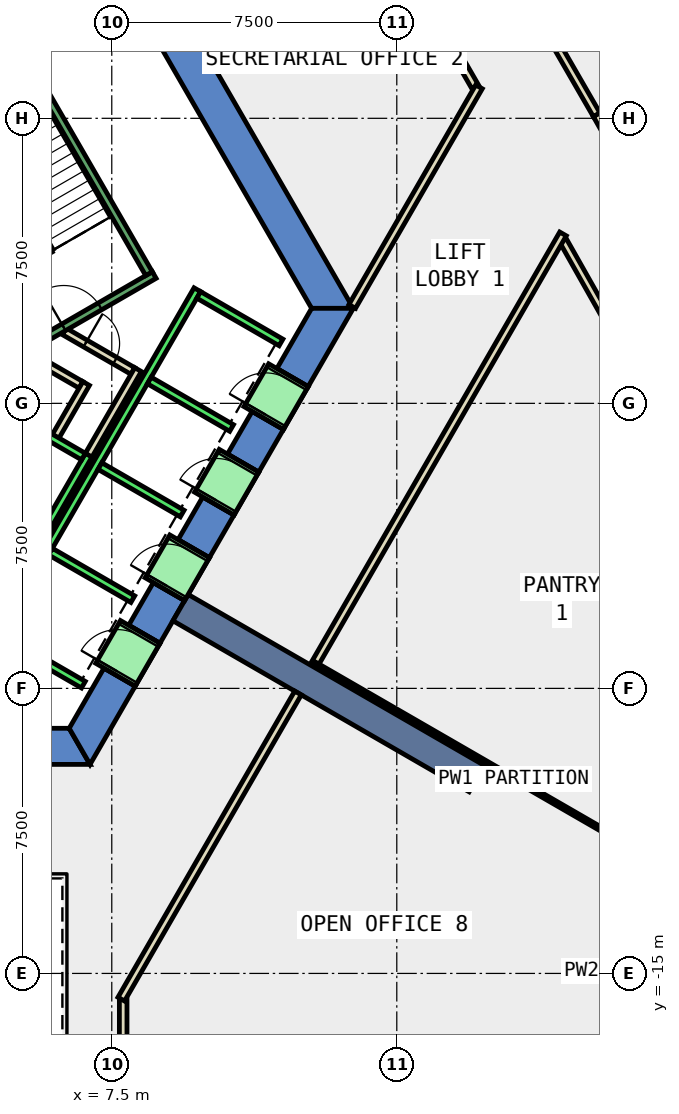
"""IFC4 building model, lengths in metres.
Left out: names, types, materials, properties, quantities, classifications, styles, units other than length and angle.
Written with IfcOpenShell. Run it as: python <this file> out.ifc"""

import sys

from ifc_helpers import new_model, si_unit, direction, frame, frame_2d, origin, place, context, subcontext, project, spatial, polyline, rectangle, outline, extrude, element, fill, save


model = new_model("IFC4")
c1 = context("Model", 3, precision=1e-05, world=origin(), true_north=direction((0.0, 1.0)))
c2 = subcontext(c1, "Body", "Model", "MODEL_VIEW")
j1 = project(units=[si_unit("LENGTHUNIT", "METRE"), si_unit("PLANEANGLEUNIT", "RADIAN")], contexts=[c1])
p1 = place(None, origin())
s1 = spatial("IfcSite", under=j1, at=p1, CompositionType="ELEMENT")
p2 = place(p1, origin())
s2 = spatial("IfcBuilding", under=s1, at=p2, CompositionType="ELEMENT")
p3 = place(p2, frame((0.0, 0.0, 72.8)))
s3 = spatial("IfcBuildingStorey", under=s2, at=p3, CompositionType="ELEMENT", Elevation=72.8)
p4 = place(p3, frame((0.0, 0.0, -0.4)))
e1 = element("IfcWall", 1, at=p4, inside=s3, PredefinedType="SHEAR", context=c2, shape_type="SweptSolid", body=[
    extrude(outline(polyline([(8.517, 11.748), (7.694, 11.273), (12.759, 2.5), (13.856, 2.5), (8.517, 11.748)])), origin(), (0.0, 0.0, 1.0), 4.2),
])
p5 = place(p3, frame((0.0, 0.0, -0.4)))
e2 = element("IfcWall", 2, at=p5, inside=s3, PredefinedType="SHEAR", context=c2, shape_type="SweptSolid", body=[
    extrude(outline(polyline([(5.75, -8.55), (5.75, -9.5), (6.928, -9.5), (6.38, -8.55), (5.75, -8.55)])), origin(), (0.0, 0.0, 1.0), 4.2),
])
p6 = place(p3, frame((0.0, 0.0, -0.4)))
e3 = element("IfcWall", 3, at=p6, inside=s3, PredefinedType="SHEAR", context=c2, shape_type="SweptSolid", body=[
    extrude(outline(polyline([(8.117, -7.44), (7.295, -6.965), (6.38, -8.55), (6.928, -9.5), (8.117, -7.44)])), origin(), (0.0, 0.0, 1.0), 4.2),
])
p7 = place(p3, frame((0.0, 0.0, -0.4)))
e4 = element("IfcWall", 4, at=p7, inside=s3, PredefinedType="SHEAR", context=c2, shape_type="SweptSolid", body=[
    extrude(outline(polyline([(9.417, -5.189), (8.594, -4.714), (7.945, -5.839), (8.767, -6.314), (9.417, -5.189)])), origin(), (0.0, 0.0, 1.0), 4.2),
])
p8 = place(p3, frame((0.0, 0.0, -0.4)))
e5 = element("IfcWall", 5, at=p8, inside=s3, PredefinedType="SHEAR", context=c2, shape_type="SweptSolid", body=[
    extrude(outline(polyline([(10.717, -2.937), (9.894, -2.462), (9.244, -3.588), (10.067, -4.063), (10.717, -2.937)])), origin(), (0.0, 0.0, 1.0), 4.2),
])
p9 = place(p3, frame((0.0, 0.0, -0.4)))
e6 = element("IfcWall", 6, at=p9, inside=s3, PredefinedType="SHEAR", context=c2, shape_type="SweptSolid", body=[
    extrude(outline(polyline([(12.017, -0.686), (11.194, -0.211), (10.544, -1.336), (11.367, -1.811), (12.017, -0.686)])), origin(), (0.0, 0.0, 1.0), 4.2),
])
p10 = place(p3, frame((0.0, 0.0, -0.4)))
e7 = element("IfcWall", 7, at=p10, inside=s3, PredefinedType="SHEAR", context=c2, shape_type="SweptSolid", body=[
    extrude(outline(polyline([(11.844, 0.915), (12.667, 0.44), (13.856, 2.5), (12.759, 2.5), (11.844, 0.915)])), origin(), (0.0, 0.0, 1.0), 4.2),
])
p11 = place(p3, frame((0.0, 0.0, 3.6)))
e8 = element("IfcWall", 8, at=p11, inside=s3, PredefinedType="SHEAR", context=c2, shape_type="SweptSolid", body=[
    extrude(outline(polyline([(8.767, -6.314), (7.945, -5.839), (7.295, -6.965), (8.117, -7.44), (8.767, -6.314)])), origin(), (0.0, 0.0, 1.0), 0.2),
])
p12 = place(p3, frame((0.0, 0.0, 3.6)))
e9 = element("IfcWall", 9, at=p12, inside=s3, PredefinedType="SHEAR", context=c2, shape_type="SweptSolid", body=[
    extrude(outline(polyline([(10.067, -4.063), (9.244, -3.588), (8.594, -4.714), (9.417, -5.189), (10.067, -4.063)])), origin(), (0.0, 0.0, 1.0), 0.2),
])
p13 = place(p3, frame((0.0, 0.0, 3.6)))
e10 = element("IfcWall", 10, at=p13, inside=s3, PredefinedType="SHEAR", context=c2, shape_type="SweptSolid", body=[
    extrude(outline(polyline([(11.367, -1.811), (10.544, -1.336), (9.894, -2.462), (10.717, -2.937), (11.367, -1.811)])), origin(), (0.0, 0.0, 1.0), 0.2),
])
p14 = place(p3, frame((0.0, 0.0, 3.6)))
e11 = element("IfcWall", 11, at=p14, inside=s3, PredefinedType="SHEAR", context=c2, shape_type="SweptSolid", body=[
    extrude(outline(polyline([(12.667, 0.44), (11.844, 0.915), (11.194, -0.211), (12.017, -0.686), (12.667, 0.44)])), origin(), (0.0, 0.0, 1.0), 0.2),
])
p15 = place(p3, frame((9.31, -5.375, -0.4), z_axis=(0.0, 0.0, 1.0), x_axis=(0.866017533419, -0.500013631625, 0.0)))
e12 = element("IfcWall", 12, at=p15, inside=s3, PredefinedType="SHEAR", context=c2, shape_type="SweptSolid", body=[
    extrude(rectangle(XDim=9.0, YDim=0.8, at=frame_2d((4.5, 0.0))), origin(), (0.0, 0.0, 1.0), 4.2),
])
p16 = place(p3, frame((17.063, 8.328, 0.0), z_axis=(0.0, 0.0, 1.0), x_axis=(-0.499986575203, 0.866033154456, 0.0)))
e13 = element("IfcWall", 13, at=p16, inside=s3, PredefinedType="PARTITIONING", context=c2, shape_type="SweptSolid", body=[
    extrude(rectangle(XDim=4.934, YDim=0.2, at=frame_2d((2.467, 0.0))), origin(), (0.0, 0.0, 1.0), 3.8),
])
p17 = place(p3, frame((21.77, 0.046, 0.0), z_axis=(0.0, 0.0, 1.0), x_axis=(-0.492148137455, 0.870511465059, 0.0)))
e14 = element("IfcWall", 14, at=p17, inside=s3, PredefinedType="PARTITIONING", context=c2, shape_type="SweptSolid", body=[
    extrude(rectangle(XDim=4.868, YDim=0.2, at=frame_2d((2.434, 0.0))), origin(), (0.0, 0.0, 1.0), 3.8),
])
p18 = place(p3, frame((20.259, 7.596, 0.0), z_axis=(0.0, 0.0, 1.0), x_axis=(0.492021755503, -0.870582903641, 0.0)))
e15 = element("IfcWall", 15, at=p18, inside=s3, PredefinedType="PARTITIONING", context=c2, shape_type="SweptSolid", body=[
    extrude(rectangle(XDim=7.251, YDim=0.2, at=frame_2d((3.626, 0.0))), origin(), (0.0, 0.0, 1.0), 3.8),
])
p19 = place(p18, frame((3.201, 0.0, 0.0)))
e16 = element("IfcOpeningElement", 16, at=p19, cuts=e15, PredefinedType="OPENING", context=c2, shape_type="SweptSolid", body=[
    extrude(rectangle(XDim=1.0, YDim=2.1, at=frame_2d((0.5, 1.05))), frame((0.0, 0.11, 0.0), z_axis=(0.0, -1.0, 0.0), x_axis=(1.0, 0.0, 0.0)), (0.0, 0.0, 1.0), 0.22),
])
p20 = place(p3, frame((16.669, 13.811, 0.0), z_axis=(0.0, 0.0, 1.0), x_axis=(0.500027672765, -0.866009426316, 0.0)))
e17 = element("IfcWall", 17, at=p20, inside=s3, PredefinedType="PARTITIONING", context=c2, shape_type="SweptSolid", body=[
    extrude(rectangle(XDim=7.178, YDim=0.2, at=frame_2d((3.589, 0.0))), origin(), (0.0, 0.0, 1.0), 3.8),
])
p21 = place(p20, frame((3.164, 0.0, 0.0)))
e18 = element("IfcOpeningElement", 18, at=p21, cuts=e17, PredefinedType="OPENING", context=c2, shape_type="SweptSolid", body=[
    extrude(rectangle(XDim=1.0, YDim=2.1, at=frame_2d((0.5, 1.05))), frame((0.0, 0.11, 0.0), z_axis=(0.0, -1.0, 0.0), x_axis=(1.0, 0.0, 0.0)), (0.0, 0.0, 1.0), 0.22),
])
p22 = place(p3, frame((5.499, 1.172, 0.0), z_axis=(0.0, 0.0, 1.0), x_axis=(0.866333505267, -0.499465972466, 0.0)))
e19 = element("IfcWall", 19, at=p22, inside=s3, PredefinedType="PARTITIONING", context=c2, shape_type="SweptSolid", body=[
    extrude(rectangle(XDim=1.374, YDim=0.2, at=frame_2d((0.687, 0.0))), origin(), (0.0, 0.0, 1.0), 3.8),
])
p23 = place(p3, frame((6.826, 0.522, 0.0), z_axis=(0.0, 0.0, 1.0), x_axis=(-0.500016722714, -0.866015748706, 0.0)))
e20 = element("IfcWall", 20, at=p23, inside=s3, PredefinedType="PARTITIONING", context=c2, shape_type="SweptSolid", body=[
    extrude(rectangle(XDim=1.7, YDim=0.2, at=frame_2d((0.85, 0.0))), origin(), (0.0, 0.0, 1.0), 3.8),
])
p24 = place(p3, frame((6.25, 1.894, 0.0), z_axis=(0.0, 0.0, 1.0), x_axis=(0.866043184279, -0.499969202016, 0.0)))
e21 = element("IfcWall", 21, at=p24, inside=s3, PredefinedType="PARTITIONING", context=c2, shape_type="SweptSolid", body=[
    extrude(rectangle(XDim=2.084, YDim=0.2, at=frame_2d((1.042, 0.0))), origin(), (0.0, 0.0, 1.0), 3.8),
])
p25 = place(p24, frame((0.642, 0.0, 0.0)))
e22 = element("IfcOpeningElement", 22, at=p25, cuts=e21, PredefinedType="OPENING", context=c2, shape_type="SweptSolid", body=[
    extrude(rectangle(XDim=0.9, YDim=2.1, at=frame_2d((0.45, 1.05))), frame((0.0, 0.11, 0.0), z_axis=(0.0, -1.0, 0.0), x_axis=(1.0, 0.0, 0.0)), (0.0, 0.0, 1.0), 0.22),
])
p26 = place(p3, frame((8.192, 0.888, 0.0), z_axis=(0.0, 0.0, 1.0), x_axis=(-0.499940625693, -0.866059680843, 0.0)))
e23 = element("IfcWall", 23, at=p26, inside=s3, PredefinedType="PARTITIONING", context=c2, shape_type="SweptSolid", body=[
    extrude(rectangle(XDim=2.68, YDim=0.2, at=frame_2d((1.34, 0.0))), origin(), (0.0, 0.0, 1.0), 3.8),
])
p27 = place(p3, frame((13.827, 2.55, 0.0), z_axis=(0.0, 0.0, 1.0), x_axis=(0.500039204794, 0.866002767703, 0.0)))
e24 = element("IfcWall", 24, at=p27, inside=s3, PredefinedType="PARTITIONING", context=c2, shape_type="SweptSolid", body=[
    extrude(rectangle(XDim=6.672, YDim=0.2, at=frame_2d((3.336, 0.0))), origin(), (0.0, 0.0, 1.0), 3.8),
])
p28 = place(p3, frame((7.8, -15.69, 0.0), z_axis=(0.0, 0.0, 1.0), x_axis=(0.0, -1.0, 0.0)))
e25 = element("IfcWall", 25, at=p28, inside=s3, PredefinedType="PARTITIONING", context=c2, shape_type="SweptSolid", body=[
    extrude(rectangle(XDim=3.121, YDim=0.2, at=frame_2d((1.561, 0.0))), origin(), (0.0, 0.0, 1.0), 3.8),
])
p29 = place(p3, frame((12.4, -7.621, 0.0), z_axis=(0.0, 0.0, 1.0), x_axis=(-0.49990497871, -0.866080257402, 0.0)))
e26 = element("IfcWall", 26, at=p29, inside=s3, PredefinedType="PARTITIONING", context=c2, shape_type="SweptSolid", body=[
    extrude(rectangle(XDim=9.302, YDim=0.2, at=frame_2d((4.651, 0.0))), origin(), (0.0, 0.0, 1.0), 3.8),
])
p30 = place(p3, frame((19.374, 4.458, 0.0), z_axis=(0.0, 0.0, 1.0), x_axis=(-0.499973880856, -0.866040483154, 0.0)))
e27 = element("IfcWall", 27, at=p30, inside=s3, PredefinedType="PARTITIONING", context=c2, shape_type="SweptSolid", body=[
    extrude(rectangle(XDim=13.113, YDim=0.2, at=frame_2d((6.556, 0.0))), origin(), (0.0, 0.0, 1.0), 3.8),
])
p31 = place(p3, frame((12.843, -6.855, 0.0), z_axis=(0.0, 0.0, 1.0), x_axis=(0.866054959007, -0.499948805358, 0.0)))
e28 = element("IfcWall", 28, at=p31, inside=s3, PredefinedType="PARTITIONING", context=c2, shape_type="SweptSolid", body=[
    extrude(rectangle(XDim=12.075, YDim=0.1, at=frame_2d((6.038, 0.0))), origin(), (0.0, 0.0, 1.0), 3.8),
])
p32 = place(p3, frame((22.969, -13.316, 0.0), z_axis=(0.0, 0.0, 1.0), x_axis=(-0.500007312183, -0.866021182053, 0.0)))
e29 = element("IfcWall", 29, at=p32, inside=s3, PredefinedType="PARTITIONING", context=c2, shape_type="SweptSolid", body=[
    extrude(rectangle(XDim=6.306, YDim=0.15, at=frame_2d((3.153, 0.0))), origin(), (0.0, 0.0, 1.0), 3.8),
])
p33 = place(p3, frame((5.492, -3.788, 0.0), z_axis=(0.0, 0.0, 1.0), x_axis=(0.500011755427, 0.866018616679, 0.0)))
e30 = element("IfcWall", 30, at=p33, inside=s3, PredefinedType="STANDARD", context=c2, shape_type="SweptSolid", body=[
    extrude(rectangle(XDim=2.8, YDim=0.2, at=frame_2d((1.4, 0.0))), origin(), (0.0, 0.0, 1.0), 3.8),
])
p34 = place(p3, frame((4.677, -0.2, 0.0), z_axis=(0.0, 0.0, 1.0), x_axis=(0.865973769406, -0.500089422704, 0.0)))
e31 = element("IfcWall", 31, at=p34, inside=s3, PredefinedType="STANDARD", context=c2, shape_type="SweptSolid", body=[
    extrude(rectangle(XDim=2.399, YDim=0.2, at=frame_2d((1.2, 0.0))), origin(), (0.0, 0.0, 1.0), 3.8),
])
p35 = place(p3, frame((4.451, -6.19, 0.0), z_axis=(0.0, 0.0, 1.0), x_axis=(0.50000090737, 0.866024879913, 0.0)))
e32 = element("IfcWall", 32, at=p35, inside=s3, PredefinedType="STANDARD", context=c2, shape_type="SweptSolid", body=[
    extrude(rectangle(XDim=10.6, YDim=0.2, at=frame_2d((5.3, 0.0))), origin(), (0.0, 0.0, 1.0), 3.8),
])
for number, where, z_axis, x_axis in (
    (33, (4.588, -6.153, 0.0), (0.0, 0.0, 1.0), (0.866, -0.5, 0.0)),
    (34, (5.888, -3.902, 0.0), (0.0, 0.0, 1.0), (0.866, -0.5, 0.0)),
    (35, (7.188, -1.65, 0.0), (0.0, 0.0, 1.0), (0.866, -0.5, 0.0)),
    (36, (8.488, 0.602, 0.0), (0.0, 0.0, 1.0), (0.866, -0.5, 0.0)),
):
    element("IfcWall", number, at=place(p3, frame(where, z_axis=z_axis, x_axis=x_axis)), inside=s3, PredefinedType="STANDARD", context=c2, shape_type="SweptSolid", body=[
        extrude(rectangle(XDim=2.5, YDim=0.2, at=frame_2d((1.25, 0.0))), origin(), (0.0, 0.0, 1.0), 3.8),
    ])
p36 = place(p3, frame((9.788, 2.853, 0.0), z_axis=(0.0, 0.0, 1.0), x_axis=(0.865998541277, -0.500046524342, 0.0)))
e37 = element("IfcWall", 37, at=p36, inside=s3, PredefinedType="STANDARD", context=c2, shape_type="SweptSolid", body=[
    extrude(rectangle(XDim=2.5, YDim=0.2, at=frame_2d((1.25, 0.0))), origin(), (0.0, 0.0, 1.0), 3.8),
])
p37 = place(p3, frame((7.598, -7.14, 0.0), z_axis=(0.0, 0.0, 1.0), x_axis=(0.500362116554, 0.865816234728, 0.0)))
e38 = element("IfcWall", 38, at=p37, inside=s3, PredefinedType="STANDARD", context=c2, shape_type="SweptSolid", body=[
    extrude(rectangle(XDim=1.299, YDim=1.2, at=frame_2d((0.65, 0.0))), origin(), (0.0, 0.0, 1.0), 2.4),
])
p38 = place(p37, frame((0.1, 0.0, 0.0)))
e39 = element("IfcOpeningElement", 39, at=p38, cuts=e38, PredefinedType="OPENING", context=c2, shape_type="SweptSolid", body=[
    extrude(rectangle(XDim=1.1, YDim=2.3, at=frame_2d((0.55, 1.15))), frame((0.0, 0.61, 0.0), z_axis=(0.0, -1.0, 0.0), x_axis=(1.0, 0.0, 0.0)), (0.0, 0.0, 1.0), 1.22),
])
p39 = place(p3, frame((8.898, -4.889, 0.0), z_axis=(0.0, 0.0, 1.0), x_axis=(0.500036693733, 0.866004217611, 0.0)))
e40 = element("IfcWall", 40, at=p39, inside=s3, PredefinedType="STANDARD", context=c2, shape_type="SweptSolid", body=[
    extrude(rectangle(XDim=1.3, YDim=1.2, at=frame_2d((0.65, 0.0))), origin(), (0.0, 0.0, 1.0), 2.4),
])
p40 = place(p39, frame((0.1, 0.0, 0.0)))
e41 = element("IfcOpeningElement", 41, at=p40, cuts=e40, PredefinedType="OPENING", context=c2, shape_type="SweptSolid", body=[
    extrude(rectangle(XDim=1.1, YDim=2.3, at=frame_2d((0.55, 1.15))), frame((0.0, 0.61, 0.0), z_axis=(0.0, -1.0, 0.0), x_axis=(1.0, 0.0, 0.0)), (0.0, 0.0, 1.0), 1.22),
])
p41 = place(p3, frame((10.198, -2.637, 0.0), z_axis=(0.0, 0.0, 1.0), x_axis=(0.49989585183, 0.866085525409, 0.0)))
e42 = element("IfcWall", 42, at=p41, inside=s3, PredefinedType="STANDARD", context=c2, shape_type="SweptSolid", body=[
    extrude(rectangle(XDim=1.3, YDim=1.2, at=frame_2d((0.65, 0.0))), origin(), (0.0, 0.0, 1.0), 2.4),
])
p42 = place(p41, frame((0.1, 0.0, 0.0)))
e43 = element("IfcOpeningElement", 43, at=p42, cuts=e42, PredefinedType="OPENING", context=c2, shape_type="SweptSolid", body=[
    extrude(rectangle(XDim=1.1, YDim=2.3, at=frame_2d((0.55, 1.15))), frame((0.0, 0.61, 0.0), z_axis=(0.0, -1.0, 0.0), x_axis=(1.0, 0.0, 0.0)), (0.0, 0.0, 1.0), 1.22),
])
p43 = place(p3, frame((11.498, -0.385, 0.0), z_axis=(0.0, 0.0, 1.0), x_axis=(0.500221244143, 0.865897630733, 0.0)))
e44 = element("IfcWall", 44, at=p43, inside=s3, PredefinedType="STANDARD", context=c2, shape_type="SweptSolid", body=[
    extrude(rectangle(XDim=1.299, YDim=1.2, at=frame_2d((0.65, 0.0))), origin(), (0.0, 0.0, 1.0), 2.4),
])
p44 = place(p43, frame((0.1, 0.0, 0.0)))
e45 = element("IfcOpeningElement", 45, at=p44, cuts=e44, PredefinedType="OPENING", context=c2, shape_type="SweptSolid", body=[
    extrude(rectangle(XDim=1.1, YDim=2.3, at=frame_2d((0.55, 1.15))), frame((0.0, 0.61, 0.0), z_axis=(0.0, -1.0, 0.0), x_axis=(1.0, 0.0, 0.0)), (0.0, 0.0, 1.0), 1.22),
])
p45 = place(p3, frame((4.806, 1.176, 0.0), z_axis=(0.0, 0.0, 1.0), x_axis=(0.866059941101, 0.499940174841, 0.0)))
e46 = element("IfcWall", 46, at=p45, inside=s3, PredefinedType="STANDARD", context=c2, shape_type="SweptSolid", body=[
    extrude(rectangle(XDim=4.4, YDim=0.2, at=frame_2d((2.2, 0.0))), origin(), (0.0, 0.0, 1.0), 3.8),
])
p46 = place(p45, frame((1.65, 0.0, 0.0)))
e47 = element("IfcOpeningElement", 47, at=p46, cuts=e46, PredefinedType="OPENING", context=c2, shape_type="SweptSolid", body=[
    extrude(rectangle(XDim=1.1, YDim=2.2, at=frame_2d((0.55, 1.1))), frame((0.0, 0.11, 0.0), z_axis=(0.0, -1.0, 0.0), x_axis=(1.0, 0.0, 0.0)), (0.0, 0.0, 1.0), 0.22),
])
p47 = place(p3, frame((8.48, 3.412, 0.0), z_axis=(0.0, 0.0, 1.0), x_axis=(-0.499978703459, 0.866037698999, 0.0)))
e48 = element("IfcWall", 48, at=p47, inside=s3, PredefinedType="STANDARD", context=c2, shape_type="SweptSolid", body=[
    extrude(rectangle(XDim=6.9, YDim=0.2, at=frame_2d((3.45, 0.0))), origin(), (0.0, 0.0, 1.0), 3.8),
])
p48 = place(p25, origin())
e49 = element("IfcDoor", 49, at=p48, inside=s3, OperationType="SINGLE_SWING_LEFT", PredefinedType="DOOR", context=c2, shape_type="SweptSolid", body=[
    extrude(rectangle(XDim=0.9, YDim=2.1, at=frame_2d((0.45, 1.05))), frame((0.0, 0.025, 0.0), z_axis=(0.0, -1.0, 0.0), x_axis=(1.0, 0.0, 0.0)), (0.0, 0.0, 1.0), 0.05),
])
fill(e22, e49)
p49 = place(p38, origin())
e50 = element("IfcDoor", 50, at=p49, inside=s3, OperationType="SLIDING_TO_LEFT", PredefinedType="DOOR", context=c2, shape_type="SweptSolid", body=[
    extrude(rectangle(XDim=1.1, YDim=2.3, at=frame_2d((0.55, 1.15))), frame((0.0, 0.025, 0.0), z_axis=(0.0, -1.0, 0.0), x_axis=(1.0, 0.0, 0.0)), (0.0, 0.0, 1.0), 0.05),
])
fill(e39, e50)
p50 = place(p40, origin())
e51 = element("IfcDoor", 51, at=p50, inside=s3, OperationType="SLIDING_TO_LEFT", PredefinedType="DOOR", context=c2, shape_type="SweptSolid", body=[
    extrude(rectangle(XDim=1.1, YDim=2.3, at=frame_2d((0.55, 1.15))), frame((0.0, 0.025, 0.0), z_axis=(0.0, -1.0, 0.0), x_axis=(1.0, 0.0, 0.0)), (0.0, 0.0, 1.0), 0.05),
])
fill(e41, e51)
p51 = place(p42, origin())
e52 = element("IfcDoor", 52, at=p51, inside=s3, OperationType="SLIDING_TO_LEFT", PredefinedType="DOOR", context=c2, shape_type="SweptSolid", body=[
    extrude(rectangle(XDim=1.1, YDim=2.3, at=frame_2d((0.55, 1.15))), frame((0.0, 0.025, 0.0), z_axis=(0.0, -1.0, 0.0), x_axis=(1.0, 0.0, 0.0)), (0.0, 0.0, 1.0), 0.05),
])
fill(e43, e52)
p52 = place(p44, origin())
e53 = element("IfcDoor", 53, at=p52, inside=s3, OperationType="SLIDING_TO_LEFT", PredefinedType="DOOR", context=c2, shape_type="SweptSolid", body=[
    extrude(rectangle(XDim=1.1, YDim=2.3, at=frame_2d((0.55, 1.15))), frame((0.0, 0.025, 0.0), z_axis=(0.0, -1.0, 0.0), x_axis=(1.0, 0.0, 0.0)), (0.0, 0.0, 1.0), 0.05),
])
fill(e45, e53)
p53 = place(p46, origin())
e54 = element("IfcDoor", 54, at=p53, inside=s3, OperationType="SINGLE_SWING_LEFT", PredefinedType="DOOR", context=c2, shape_type="SweptSolid", body=[
    extrude(rectangle(XDim=1.1, YDim=2.2, at=frame_2d((0.55, 1.1))), frame((0.0, 0.025, 0.0), z_axis=(0.0, -1.0, 0.0), x_axis=(1.0, 0.0, 0.0)), (0.0, 0.0, 1.0), 0.05),
])
fill(e47, e54)
save(model, sys.argv[1])
